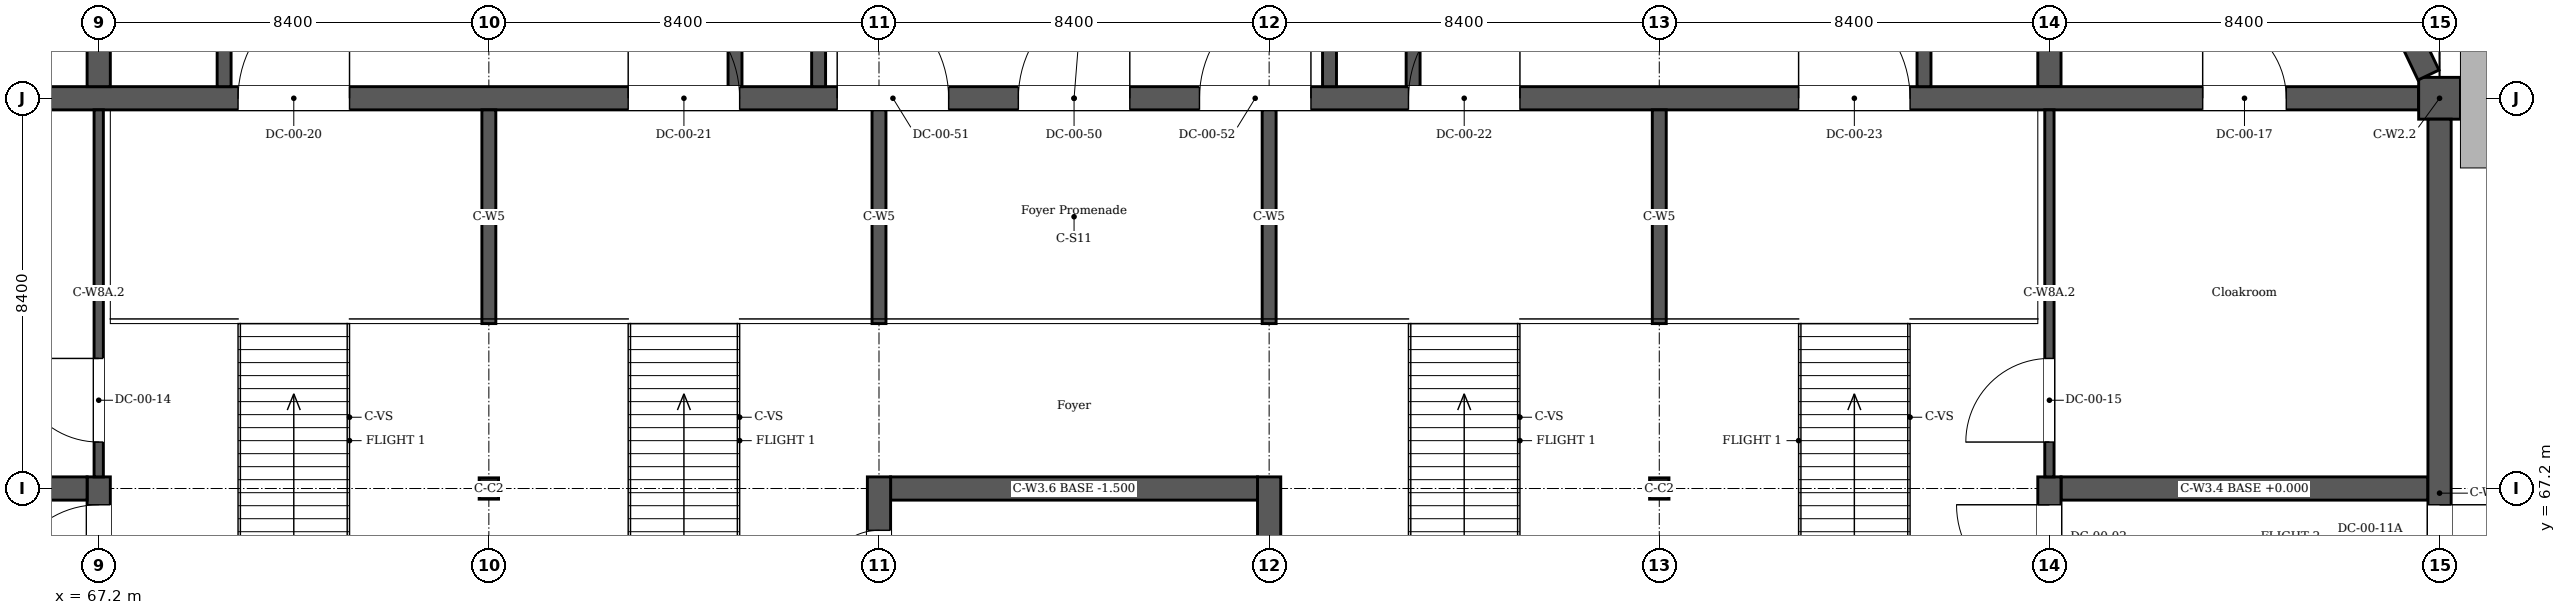
"""IFC4 building model, lengths in metres.
Left out: names, types, materials, properties, quantities, classifications, styles, units other than length and angle.
Written with IfcOpenShell. Run it as: python <this file> out.ifc"""

import sys

from ifc_helpers import new_model, si_unit, direction, frame, frame_2d, origin, origin_2d, place, context, subcontext, project, spatial, polyline, rectangle, i_section, outline, extrude, element, fill, save


model = new_model("IFC4")
c1 = context("Model", 3, precision=1e-05, world=origin(), true_north=direction((0.0, 1.0)))
c2 = subcontext(c1, "Body", "Model", "MODEL_VIEW")
j1 = project(units=[si_unit("LENGTHUNIT", "METRE"), si_unit("PLANEANGLEUNIT", "RADIAN")], contexts=[c1])
p1 = place(None, origin())
s1 = spatial("IfcSite", under=j1, at=p1, CompositionType="ELEMENT")
p2 = place(p1, origin())
s2 = spatial("IfcBuilding", under=s1, at=p2, CompositionType="ELEMENT")
p3 = place(p2, origin())
s3 = spatial("IfcBuildingStorey", under=s2, at=p3, CompositionType="ELEMENT", Elevation=0.0)
p4 = place(p3, frame((117.6, 75.15, 0.0), z_axis=(0.0, 0.0, 1.0), x_axis=(0.0, -1.0, 0.0)))
e1 = element("IfcWall", 1, at=p4, inside=s3, PredefinedType="SOLIDWALL", context=c2, shape_type="SweptSolid", body=[
    extrude(rectangle(XDim=16.1, YDim=0.5, at=frame_2d((8.05, 0.0))), origin(), (0.0, 0.0, 1.0), 6.0),
])
p5 = place(p4, frame((8.3, 0.0, 0.0)))
e2 = element("IfcOpeningElement", 2, at=p5, cuts=e1, PredefinedType="OPENING", context=c2, shape_type="SweptSolid", body=[
    extrude(rectangle(XDim=2.0, YDim=2.1, at=frame_2d((1.0, 1.05))), frame((0.0, 0.26, 0.0), z_axis=(0.0, -1.0, 0.0), x_axis=(1.0, 0.0, 0.0)), (0.0, 0.0, 1.0), 0.52),
])
p6 = place(p3, frame((113.666, 83.863, 0.0), z_axis=(0.0, 0.0, 1.0), x_axis=(0.429922557701, -0.902865767642, 0.0)))
e3 = element("IfcWall", 3, at=p6, inside=s3, PredefinedType="SOLIDWALL", context=c2, shape_type="SweptSolid", body=[
    extrude(rectangle(XDim=8.598, YDim=0.5, at=frame_2d((4.299, 0.0))), origin(), (0.0, 0.0, 1.0), 6.0),
])
p7 = place(p6, frame((3.3, 0.0, 0.0)))
e4 = element("IfcOpeningElement", 4, at=p7, cuts=e3, PredefinedType="OPENING", context=c2, shape_type="SweptSolid", body=[
    extrude(rectangle(XDim=2.4, YDim=2.1, at=frame_2d((1.2, 1.05))), frame((0.0, 0.26, 0.0), z_axis=(0.0, -1.0, 0.0), x_axis=(1.0, 0.0, 0.0)), (0.0, 0.0, 1.0), 0.52),
])
p8 = place(p3, frame((117.6, 75.15, 0.0), z_axis=(0.0, 0.0, 1.0), x_axis=(0.0, 1.0, 0.0)))
e5 = element("IfcWall", 5, at=p8, inside=s3, PredefinedType="SOLIDWALL", context=c2, shape_type="SweptSolid", body=[
    extrude(rectangle(XDim=0.9, YDim=0.9, at=frame_2d((0.45, 0.0))), origin(), (0.0, 0.0, 1.0), 6.0),
])
p9 = place(p3, frame((59.25, 75.6, 0.0), z_axis=(0.0, 0.0, 1.0), x_axis=(1.0, 0.0, 0.0)))
e6 = element("IfcWall", 6, at=p9, inside=s3, PredefinedType="SOLIDWALL", context=c2, shape_type="SweptSolid", body=[
    extrude(rectangle(XDim=57.9, YDim=0.5, at=frame_2d((28.95, 0.0))), origin(), (0.0, 0.0, 1.0), 6.0),
])
p10 = place(p9, frame((1.85, 0.0, 0.0)))
e7 = element("IfcOpeningElement", 7, at=p10, cuts=e6, PredefinedType="OPENING", context=c2, shape_type="SweptSolid", body=[
    extrude(rectangle(XDim=1.8, YDim=2.1, at=frame_2d((0.9, 1.05))), frame((0.0, 0.26, 0.0), z_axis=(0.0, -1.0, 0.0), x_axis=(1.0, 0.0, 0.0)), (0.0, 0.0, 1.0), 0.52),
])
p11 = place(p9, frame((53.25, 0.0, 0.0)))
e8 = element("IfcOpeningElement", 8, at=p11, cuts=e6, PredefinedType="OPENING", context=c2, shape_type="SweptSolid", body=[
    extrude(rectangle(XDim=1.8, YDim=2.1, at=frame_2d((0.9, 1.05))), frame((0.0, 0.26, 0.0), z_axis=(0.0, -1.0, 0.0), x_axis=(1.0, 0.0, 0.0)), (0.0, 0.0, 1.0), 0.52),
])
p12 = place(p9, frame((10.95, 0.0, 3.0)))
e9 = element("IfcOpeningElement", 9, at=p12, cuts=e6, PredefinedType="OPENING", context=c2, shape_type="SweptSolid", body=[
    extrude(rectangle(XDim=2.4, YDim=2.1, at=frame_2d((1.2, 1.05))), frame((0.0, 0.26, 0.0), z_axis=(0.0, -1.0, 0.0), x_axis=(1.0, 0.0, 0.0)), (0.0, 0.0, 1.0), 0.52),
])
p13 = place(p9, frame((19.35, 0.0, 3.0)))
e10 = element("IfcOpeningElement", 10, at=p13, cuts=e6, PredefinedType="OPENING", context=c2, shape_type="SweptSolid", body=[
    extrude(rectangle(XDim=2.4, YDim=2.1, at=frame_2d((1.2, 1.05))), frame((0.0, 0.26, 0.0), z_axis=(0.0, -1.0, 0.0), x_axis=(1.0, 0.0, 0.0)), (0.0, 0.0, 1.0), 0.52),
])
p14 = place(p9, frame((36.15, 0.0, 3.0)))
e11 = element("IfcOpeningElement", 11, at=p14, cuts=e6, PredefinedType="OPENING", context=c2, shape_type="SweptSolid", body=[
    extrude(rectangle(XDim=2.4, YDim=2.1, at=frame_2d((1.2, 1.05))), frame((0.0, 0.26, 0.0), z_axis=(0.0, -1.0, 0.0), x_axis=(1.0, 0.0, 0.0)), (0.0, 0.0, 1.0), 0.52),
])
p15 = place(p9, frame((44.55, 0.0, 3.0)))
e12 = element("IfcOpeningElement", 12, at=p15, cuts=e6, PredefinedType="OPENING", context=c2, shape_type="SweptSolid", body=[
    extrude(rectangle(XDim=2.4, YDim=2.1, at=frame_2d((1.2, 1.05))), frame((0.0, 0.26, 0.0), z_axis=(0.0, -1.0, 0.0), x_axis=(1.0, 0.0, 0.0)), (0.0, 0.0, 1.0), 0.52),
])
p16 = place(p9, frame((27.75, 0.0, 3.0)))
e13 = element("IfcOpeningElement", 13, at=p16, cuts=e6, PredefinedType="OPENING", context=c2, shape_type="SweptSolid", body=[
    extrude(rectangle(XDim=2.4, YDim=2.1, at=frame_2d((1.2, 1.05))), frame((0.0, 0.26, 0.0), z_axis=(0.0, -1.0, 0.0), x_axis=(1.0, 0.0, 0.0)), (0.0, 0.0, 1.0), 0.52),
])
p17 = place(p9, frame((23.85, 0.0, 3.0)))
e14 = element("IfcOpeningElement", 14, at=p17, cuts=e6, PredefinedType="OPENING", context=c2, shape_type="SweptSolid", body=[
    extrude(rectangle(XDim=2.4, YDim=2.1, at=frame_2d((1.2, 1.05))), frame((0.0, 0.26, 0.0), z_axis=(0.0, -1.0, 0.0), x_axis=(1.0, 0.0, 0.0)), (0.0, 0.0, 1.0), 0.52),
])
p18 = place(p9, frame((31.65, 0.0, 3.0)))
e15 = element("IfcOpeningElement", 15, at=p18, cuts=e6, PredefinedType="OPENING", context=c2, shape_type="SweptSolid", body=[
    extrude(rectangle(XDim=2.4, YDim=2.1, at=frame_2d((1.2, 1.05))), frame((0.0, 0.26, 0.0), z_axis=(0.0, -1.0, 0.0), x_axis=(1.0, 0.0, 0.0)), (0.0, 0.0, 1.0), 0.52),
])
p19 = place(p3, frame((67.2, 75.85, 0.0), z_axis=(0.0, 0.0, 1.0), x_axis=(0.0, 1.0, 0.0)))
e16 = element("IfcWall", 16, at=p19, inside=s3, PredefinedType="SOLIDWALL", context=c2, shape_type="SweptSolid", body=[
    extrude(rectangle(XDim=41.5, YDim=0.5, at=frame_2d((20.75, 0.0))), origin(), (0.0, 0.0, 1.0), 6.0),
])
p20 = place(p19, frame((24.55, 0.0, 0.0)))
e17 = element("IfcOpeningElement", 17, at=p20, cuts=e16, PredefinedType="OPENING", context=c2, shape_type="SweptSolid", body=[
    extrude(rectangle(XDim=2.0, YDim=2.4, at=frame_2d((1.0, 1.2))), frame((0.0, 0.26, 0.0), z_axis=(0.0, -1.0, 0.0), x_axis=(1.0, 0.0, 0.0)), (0.0, 0.0, 1.0), 0.52),
])
p21 = place(p3, frame((109.2, 117.35, 0.0), z_axis=(0.0, 0.0, 1.0), x_axis=(0.0, -1.0, 0.0)))
e18 = element("IfcWall", 18, at=p21, inside=s3, PredefinedType="SOLIDWALL", context=c2, shape_type="SweptSolid", body=[
    extrude(rectangle(XDim=41.5, YDim=0.5, at=frame_2d((20.75, 0.0))), origin(), (0.0, 0.0, 1.0), 6.0),
])
p22 = place(p21, frame((14.95, 0.0, 0.0)))
e19 = element("IfcOpeningElement", 19, at=p22, cuts=e18, PredefinedType="OPENING", context=c2, shape_type="SweptSolid", body=[
    extrude(rectangle(XDim=2.0, YDim=2.4, at=frame_2d((1.0, 1.2))), frame((0.0, 0.26, 0.0), z_axis=(0.0, -1.0, 0.0), x_axis=(1.0, 0.0, 0.0)), (0.0, 0.0, 1.0), 0.52),
])
for number, where, z_axis, x_axis in (
    (20, (69.9, 95.767, 0.0), (0.0, 0.0, 1.0), (0.0, -1.0, 0.0)),
    (21, (80.9, 95.767, 0.0), (0.0, 0.0, 1.0), (0.0, -1.0, 0.0)),
    (22, (82.7, 95.767, 0.0), (0.0, 0.0, 1.0), (0.0, -1.0, 0.0)),
    (23, (93.7, 95.767, 0.0), (0.0, 0.0, 1.0), (0.0, -1.0, 0.0)),
    (24, (95.5, 95.767, 0.0), (0.0, 0.0, 1.0), (0.0, -1.0, 0.0)),
    (25, (106.5, 95.767, 0.0), (0.0, 0.0, 1.0), (0.0, -1.0, 0.0)),
):
    element("IfcWall", number, at=place(p3, frame(where, z_axis=z_axis, x_axis=x_axis)), inside=s3, PredefinedType="SOLIDWALL", context=c2, shape_type="SweptSolid", body=[
        extrude(outline(polyline([(0.0, 0.0), (19.917, 0.0), (19.917, 2.6), (13.767, 2.594), (0.0, 0.3), (0.0, 0.0)])), frame((0.0, 0.15, 0.0), z_axis=(0.0, -1.0, 0.0), x_axis=(1.0, 0.0, 0.0)), (0.0, 0.0, 1.0), 0.3),
    ])
for number, where, z_axis, x_axis in (
    (26, (75.6, 67.2, 0.0), (0.0, 0.0, 1.0), (1.0, 0.0, 0.0)),
    (27, (100.8, 67.2, 0.0), (0.0, 0.0, 1.0), (1.0, 0.0, 0.0)),
):
    element("IfcColumn", number, at=place(p3, frame(where, z_axis=z_axis, x_axis=x_axis)), inside=s3, PredefinedType="COLUMN", context=c2, shape_type="SweptSolid", body=[
        extrude(i_section(OverallWidth=0.417, OverallDepth=0.458, WebThickness=0.03, FlangeThickness=0.05, FilletRadius=0.022, at=origin_2d()), origin(), (0.0, 0.0, 1.0), 6.0),
    ])
for number, where, z_axis, x_axis in (
    (28, (75.6, 70.75, 0.0), (0.0, 0.0, 1.0), (0.0, 1.0, 0.0)),
    (29, (84.0, 70.75, 0.0), (0.0, 0.0, 1.0), (0.0, 1.0, 0.0)),
    (30, (92.4, 70.75, 0.0), (0.0, 0.0, 1.0), (0.0, 1.0, 0.0)),
    (31, (100.8, 70.75, 0.0), (0.0, 0.0, 1.0), (0.0, 1.0, 0.0)),
):
    element("IfcWall", number, at=place(p3, frame(where, z_axis=z_axis, x_axis=x_axis)), inside=s3, PredefinedType="SOLIDWALL", context=c2, shape_type="SweptSolid", body=[
        extrude(rectangle(XDim=4.6, YDim=0.3, at=frame_2d((2.3, 0.0))), origin(), (0.0, 0.0, 1.0), 2.6),
    ])
p23 = place(p3, frame((67.2, 59.05, 0.0), z_axis=(0.0, 0.0, 1.0), x_axis=(0.0, 1.0, 0.0)))
e32 = element("IfcWall", 32, at=p23, inside=s3, PredefinedType="SOLIDWALL", context=c2, shape_type="SweptSolid", body=[
    extrude(rectangle(XDim=8.4, YDim=0.5, at=frame_2d((4.2, 0.0))), origin(), (0.0, 0.0, 1.0), 6.0),
])
p24 = place(p23, frame((5.8, 0.0, 0.0)))
e33 = element("IfcOpeningElement", 33, at=p24, cuts=e32, PredefinedType="OPENING", context=c2, shape_type="SweptSolid", body=[
    extrude(rectangle(XDim=2.0, YDim=2.1, at=frame_2d((1.0, 1.05))), frame((0.0, 0.26, 0.0), z_axis=(0.0, -1.0, 0.0), x_axis=(1.0, 0.0, 0.0)), (0.0, 0.0, 1.0), 0.52),
])
p25 = place(p3, frame((59.05, 67.2, 0.0), z_axis=(0.0, 0.0, 1.0), x_axis=(1.0, 0.0, 0.0)))
e34 = element("IfcWall", 34, at=p25, inside=s3, PredefinedType="SOLIDWALL", context=c2, shape_type="SweptSolid", body=[
    extrude(rectangle(XDim=7.9, YDim=0.5, at=frame_2d((3.95, 0.0))), origin(), (0.0, 0.0, 1.0), 6.0),
])
p26 = place(p3, frame((109.2, 59.05, 0.0), z_axis=(0.0, 0.0, 1.0), x_axis=(0.0, 1.0, 0.0)))
e35 = element("IfcWall", 35, at=p26, inside=s3, PredefinedType="SOLIDWALL", context=c2, shape_type="SweptSolid", body=[
    extrude(rectangle(XDim=8.4, YDim=0.5, at=frame_2d((4.2, 0.0))), origin(), (0.0, 0.0, 1.0), 6.0),
])
p27 = place(p26, frame((5.8, 0.0, 0.0)))
e36 = element("IfcOpeningElement", 36, at=p27, cuts=e35, PredefinedType="OPENING", context=c2, shape_type="SweptSolid", body=[
    extrude(rectangle(XDim=2.0, YDim=2.1, at=frame_2d((1.0, 1.05))), frame((0.0, 0.26, 0.0), z_axis=(0.0, -1.0, 0.0), x_axis=(1.0, 0.0, 0.0)), (0.0, 0.0, 1.0), 0.52),
])
p28 = place(p3, frame((109.45, 67.2, 0.0), z_axis=(0.0, 0.0, 1.0), x_axis=(1.0, 0.0, 0.0)))
e37 = element("IfcWall", 37, at=p28, inside=s3, PredefinedType="SOLIDWALL", context=c2, shape_type="SweptSolid", body=[
    extrude(rectangle(XDim=7.9, YDim=0.5, at=frame_2d((3.95, 0.0))), origin(), (0.0, 0.0, 1.0), 6.0),
])
p29 = place(p3, frame((92.4, 59.05, -1.5), z_axis=(0.0, 0.0, 1.0), x_axis=(0.0, 1.0, 0.0)))
e38 = element("IfcWall", 38, at=p29, inside=s3, PredefinedType="SOLIDWALL", context=c2, shape_type="SweptSolid", body=[
    extrude(rectangle(XDim=8.4, YDim=0.5, at=frame_2d((4.2, 0.0))), origin(), (0.0, 0.0, 1.0), 7.5),
])
p30 = place(p3, frame((84.0, 59.05, -1.5), z_axis=(0.0, 0.0, 1.0), x_axis=(0.0, 1.0, 0.0)))
e39 = element("IfcWall", 39, at=p30, inside=s3, PredefinedType="SOLIDWALL", context=c2, shape_type="SweptSolid", body=[
    extrude(rectangle(XDim=8.4, YDim=0.5, at=frame_2d((4.2, 0.0))), origin(), (0.0, 0.0, 1.0), 7.5),
])
p31 = place(p30, frame((6.05, 0.0, 1.5)))
e40 = element("IfcOpeningElement", 40, at=p31, cuts=e39, PredefinedType="OPENING", context=c2, shape_type="SweptSolid", body=[
    extrude(rectangle(XDim=1.2, YDim=2.1, at=frame_2d((0.6, 1.05))), frame((0.0, 0.26, 0.0), z_axis=(0.0, -1.0, 0.0), x_axis=(1.0, 0.0, 0.0)), (0.0, 0.0, 1.0), 0.52),
])
p32 = place(p3, frame((84.25, 67.2, -1.5), z_axis=(0.0, 0.0, 1.0), x_axis=(1.0, 0.0, 0.0)))
e41 = element("IfcWall", 41, at=p32, inside=s3, PredefinedType="SOLIDWALL", context=c2, shape_type="SweptSolid", body=[
    extrude(rectangle(XDim=7.9, YDim=0.5, at=frame_2d((3.95, 0.0))), origin(), (0.0, 0.0, 1.0), 7.5),
])
p33 = place(p3, frame((67.2, 67.45, 0.0), z_axis=(0.0, 0.0, 1.0), x_axis=(0.0, 1.0, 0.0)))
e42 = element("IfcWall", 42, at=p33, inside=s3, PredefinedType="PARTITIONING", context=c2, shape_type="SweptSolid", body=[
    extrude(rectangle(XDim=7.9, YDim=0.2, at=frame_2d((3.95, 0.0))), origin(), (0.0, 0.0, 1.0), 6.0),
])
p34 = place(p33, frame((0.75, 0.0, 0.0)))
e43 = element("IfcOpeningElement", 43, at=p34, cuts=e42, PredefinedType="OPENING", context=c2, shape_type="SweptSolid", body=[
    extrude(rectangle(XDim=1.8, YDim=2.1, at=frame_2d((0.9, 1.05))), frame((0.0, 0.11, 0.0), z_axis=(0.0, -1.0, 0.0), x_axis=(1.0, 0.0, 0.0)), (0.0, 0.0, 1.0), 0.22),
])
p35 = place(p3, frame((109.2, 67.45, 0.0), z_axis=(0.0, 0.0, 1.0), x_axis=(0.0, 1.0, 0.0)))
e44 = element("IfcWall", 44, at=p35, inside=s3, PredefinedType="PARTITIONING", context=c2, shape_type="SweptSolid", body=[
    extrude(rectangle(XDim=7.9, YDim=0.2, at=frame_2d((3.95, 0.0))), origin(), (0.0, 0.0, 1.0), 6.0),
])
p36 = place(p35, frame((0.75, 0.0, 0.0)))
e45 = element("IfcOpeningElement", 45, at=p36, cuts=e44, PredefinedType="OPENING", context=c2, shape_type="SweptSolid", body=[
    extrude(rectangle(XDim=1.8, YDim=2.1, at=frame_2d((0.9, 1.05))), frame((0.0, 0.11, 0.0), z_axis=(0.0, -1.0, 0.0), x_axis=(1.0, 0.0, 0.0)), (0.0, 0.0, 1.0), 0.22),
])
p37 = place(p24, origin())
e46 = element("IfcDoor", 46, at=p37, inside=s3, OperationType="DOUBLE_DOOR_DOUBLE_SWING", PredefinedType="DOOR", context=c2, shape_type="SweptSolid", body=[
    extrude(rectangle(XDim=2.0, YDim=2.1, at=frame_2d((1.0, 1.05))), frame((0.0, 0.025, 0.0), z_axis=(0.0, -1.0, 0.0), x_axis=(1.0, 0.0, 0.0)), (0.0, 0.0, 1.0), 0.05),
])
fill(e33, e46)
p38 = place(p27, origin())
e47 = element("IfcDoor", 47, at=p38, inside=s3, OperationType="DOUBLE_DOOR_DOUBLE_SWING", PredefinedType="DOOR", context=c2, shape_type="SweptSolid", body=[
    extrude(rectangle(XDim=2.0, YDim=2.1, at=frame_2d((1.0, 1.05))), frame((0.0, 0.025, 0.0), z_axis=(0.0, -1.0, 0.0), x_axis=(1.0, 0.0, 0.0)), (0.0, 0.0, 1.0), 0.05),
])
fill(e36, e47)
p39 = place(p31, origin())
e48 = element("IfcDoor", 48, at=p39, inside=s3, OperationType="SINGLE_SWING_LEFT", PredefinedType="DOOR", context=c2, shape_type="SweptSolid", body=[
    extrude(rectangle(XDim=1.2, YDim=2.1, at=frame_2d((0.6, 1.05))), frame((0.0, 0.025, 0.0), z_axis=(0.0, -1.0, 0.0), x_axis=(1.0, 0.0, 0.0)), (0.0, 0.0, 1.0), 0.05),
])
fill(e40, e48)
p40 = place(p5, origin())
e49 = element("IfcDoor", 49, at=p40, inside=s3, OperationType="DOUBLE_DOOR_DOUBLE_SWING", PredefinedType="DOOR", context=c2, shape_type="SweptSolid", body=[
    extrude(rectangle(XDim=2.0, YDim=2.1, at=frame_2d((1.0, 1.05))), frame((0.0, 0.025, 0.0), z_axis=(0.0, -1.0, 0.0), x_axis=(1.0, 0.0, 0.0)), (0.0, 0.0, 1.0), 0.05),
])
fill(e2, e49)
p41 = place(p34, origin())
e50 = element("IfcDoor", 50, at=p41, inside=s3, OperationType="DOUBLE_DOOR_DOUBLE_SWING", PredefinedType="DOOR", context=c2, shape_type="SweptSolid", body=[
    extrude(rectangle(XDim=1.8, YDim=2.1, at=frame_2d((0.9, 1.05))), frame((0.0, 0.025, 0.0), z_axis=(0.0, -1.0, 0.0), x_axis=(1.0, 0.0, 0.0)), (0.0, 0.0, 1.0), 0.05),
])
fill(e43, e50)
p42 = place(p36, origin())
e51 = element("IfcDoor", 51, at=p42, inside=s3, OperationType="DOUBLE_DOOR_DOUBLE_SWING", PredefinedType="DOOR", context=c2, shape_type="SweptSolid", body=[
    extrude(rectangle(XDim=1.8, YDim=2.1, at=frame_2d((0.9, 1.05))), frame((0.0, 0.025, 0.0), z_axis=(0.0, -1.0, 0.0), x_axis=(1.0, 0.0, 0.0)), (0.0, 0.0, 1.0), 0.05),
])
fill(e45, e51)
p43 = place(p11, origin())
e52 = element("IfcDoor", 52, at=p43, inside=s3, OperationType="DOUBLE_DOOR_DOUBLE_SWING", PredefinedType="DOOR", context=c2, shape_type="SweptSolid", body=[
    extrude(rectangle(XDim=1.8, YDim=2.1, at=frame_2d((0.9, 1.05))), frame((0.0, 0.025, 0.0), z_axis=(0.0, -1.0, 0.0), x_axis=(1.0, 0.0, 0.0)), (0.0, 0.0, 1.0), 0.05),
])
fill(e8, e52)
p44 = place(p12, origin())
e53 = element("IfcDoor", 53, at=p44, inside=s3, OperationType="DOUBLE_DOOR_DOUBLE_SWING", PredefinedType="DOOR", context=c2, shape_type="SweptSolid", body=[
    extrude(rectangle(XDim=2.4, YDim=2.1, at=frame_2d((1.2, 1.05))), frame((0.0, 0.025, 0.0), z_axis=(0.0, -1.0, 0.0), x_axis=(1.0, 0.0, 0.0)), (0.0, 0.0, 1.0), 0.05),
])
fill(e9, e53)
p45 = place(p13, origin())
e54 = element("IfcDoor", 54, at=p45, inside=s3, OperationType="DOUBLE_DOOR_DOUBLE_SWING", PredefinedType="DOOR", context=c2, shape_type="SweptSolid", body=[
    extrude(rectangle(XDim=2.4, YDim=2.1, at=frame_2d((1.2, 1.05))), frame((0.0, 0.025, 0.0), z_axis=(0.0, -1.0, 0.0), x_axis=(1.0, 0.0, 0.0)), (0.0, 0.0, 1.0), 0.05),
])
fill(e10, e54)
p46 = place(p14, origin())
e55 = element("IfcDoor", 55, at=p46, inside=s3, OperationType="DOUBLE_DOOR_DOUBLE_SWING", PredefinedType="DOOR", context=c2, shape_type="SweptSolid", body=[
    extrude(rectangle(XDim=2.4, YDim=2.1, at=frame_2d((1.2, 1.05))), frame((0.0, 0.025, 0.0), z_axis=(0.0, -1.0, 0.0), x_axis=(1.0, 0.0, 0.0)), (0.0, 0.0, 1.0), 0.05),
])
fill(e11, e55)
p47 = place(p15, origin())
e56 = element("IfcDoor", 56, at=p47, inside=s3, OperationType="DOUBLE_DOOR_DOUBLE_SWING", PredefinedType="DOOR", context=c2, shape_type="SweptSolid", body=[
    extrude(rectangle(XDim=2.4, YDim=2.1, at=frame_2d((1.2, 1.05))), frame((0.0, 0.025, 0.0), z_axis=(0.0, -1.0, 0.0), x_axis=(1.0, 0.0, 0.0)), (0.0, 0.0, 1.0), 0.05),
])
fill(e12, e56)
p48 = place(p16, origin())
e57 = element("IfcDoor", 57, at=p48, inside=s3, OperationType="DOUBLE_DOOR_DOUBLE_SWING", PredefinedType="DOOR", context=c2, shape_type="SweptSolid", body=[
    extrude(rectangle(XDim=2.4, YDim=2.1, at=frame_2d((1.2, 1.05))), frame((0.0, 0.025, 0.0), z_axis=(0.0, -1.0, 0.0), x_axis=(1.0, 0.0, 0.0)), (0.0, 0.0, 1.0), 0.05),
])
fill(e13, e57)
p49 = place(p17, origin())
e58 = element("IfcDoor", 58, at=p49, inside=s3, OperationType="DOUBLE_DOOR_DOUBLE_SWING", PredefinedType="DOOR", context=c2, shape_type="SweptSolid", body=[
    extrude(rectangle(XDim=2.4, YDim=2.1, at=frame_2d((1.2, 1.05))), frame((0.0, 0.025, 0.0), z_axis=(0.0, -1.0, 0.0), x_axis=(1.0, 0.0, 0.0)), (0.0, 0.0, 1.0), 0.05),
])
fill(e14, e58)
p50 = place(p18, origin())
e59 = element("IfcDoor", 59, at=p50, inside=s3, OperationType="DOUBLE_DOOR_DOUBLE_SWING", PredefinedType="DOOR", context=c2, shape_type="SweptSolid", body=[
    extrude(rectangle(XDim=2.4, YDim=2.1, at=frame_2d((1.2, 1.05))), frame((0.0, 0.025, 0.0), z_axis=(0.0, -1.0, 0.0), x_axis=(1.0, 0.0, 0.0)), (0.0, 0.0, 1.0), 0.05),
])
fill(e15, e59)
save(model, sys.argv[1])
